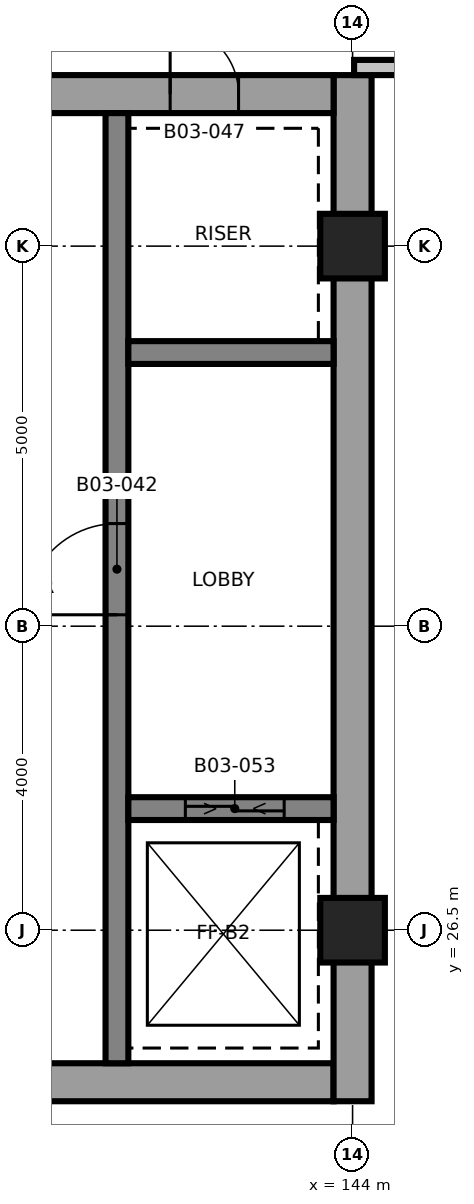
"""IFC4 building model, lengths in metres.
Left out: names, types, materials, properties, quantities, classifications, styles, units other than length and angle.
Written with IfcOpenShell. Run it as: python <this file> out.ifc"""

import sys

from ifc_helpers import new_model, si_unit, direction, frame, frame_2d, origin, origin_2d, place, context, subcontext, project, spatial, rectangle, extrude, element, fill, save


model = new_model("IFC4")
c1 = context("Model", 3, precision=1e-05, world=origin(), true_north=direction((0.0, 1.0)))
c2 = subcontext(c1, "Body", "Model", "MODEL_VIEW")
j1 = project(units=[si_unit("LENGTHUNIT", "METRE"), si_unit("PLANEANGLEUNIT", "RADIAN")], contexts=[c1])
p1 = place(None, origin())
s1 = spatial("IfcSite", under=j1, at=p1, CompositionType="ELEMENT")
p2 = place(p1, origin())
s2 = spatial("IfcBuilding", under=s1, at=p2, CompositionType="ELEMENT")
p3 = place(p2, frame((0.0, 0.0, 59.4)))
s3 = spatial("IfcBuildingStorey", under=s2, at=p3, CompositionType="ELEMENT", Elevation=59.4)
p4 = place(p3, frame((128.75, 24.5, 0.0), z_axis=(0.0, 0.0, 1.0), x_axis=(1.0, 0.0, 0.0)))
e1 = element("IfcWall", 1, at=p4, inside=s3, PredefinedType="SHEAR", context=c2, shape_type="SweptSolid", body=[
    extrude(rectangle(XDim=15.0, YDim=0.5, at=frame_2d((7.5, 0.0))), origin(), (0.0, 0.0, 1.0), 3.7),
])
p5 = place(p4, frame((9.65, 0.0, 0.0)))
e2 = element("IfcOpeningElement", 2, at=p5, cuts=e1, PredefinedType="OPENING", context=c2, shape_type="SweptSolid", body=[
    extrude(rectangle(XDim=1.5, YDim=2.1, at=frame_2d((0.75, 1.05))), frame((0.0, 0.26, 0.0), z_axis=(0.0, -1.0, 0.0), x_axis=(1.0, 0.0, 0.0)), (0.0, 0.0, 1.0), 0.52),
])
p6 = place(p4, frame((1.25, 0.0, 0.0)))
e3 = element("IfcOpeningElement", 3, at=p6, cuts=e1, PredefinedType="OPENING", context=c2, shape_type="SweptSolid", body=[
    extrude(rectangle(XDim=0.9, YDim=2.1, at=frame_2d((0.45, 1.05))), frame((0.0, 0.26, 0.0), z_axis=(0.0, -1.0, 0.0), x_axis=(1.0, 0.0, 0.0)), (0.0, 0.0, 1.0), 0.52),
])
p7 = place(p3, frame((144.0, 24.25, 0.0), z_axis=(0.0, 0.0, 1.0), x_axis=(0.0, 1.0, 0.0)))
e4 = element("IfcWall", 4, at=p7, inside=s3, PredefinedType="SHEAR", context=c2, shape_type="SweptSolid", body=[
    extrude(rectangle(XDim=13.5, YDim=0.5, at=frame_2d((6.75, 0.0))), origin(), (0.0, 0.0, 1.0), 3.7),
])
p8 = place(p3, frame((128.75, 37.5, 0.0), z_axis=(0.0, 0.0, 1.0), x_axis=(1.0, 0.0, 0.0)))
e5 = element("IfcWall", 5, at=p8, inside=s3, PredefinedType="SHEAR", context=c2, shape_type="SweptSolid", body=[
    extrude(rectangle(XDim=15.0, YDim=0.5, at=frame_2d((7.5, 0.0))), origin(), (0.0, 0.0, 1.0), 3.7),
])
p9 = place(p8, frame((9.65, 0.0, 0.0)))
e6 = element("IfcOpeningElement", 6, at=p9, cuts=e5, PredefinedType="OPENING", context=c2, shape_type="SweptSolid", body=[
    extrude(rectangle(XDim=1.5, YDim=2.1, at=frame_2d((0.75, 1.05))), frame((0.0, 0.26, 0.0), z_axis=(0.0, -1.0, 0.0), x_axis=(1.0, 0.0, 0.0)), (0.0, 0.0, 1.0), 0.52),
])
p10 = place(p8, frame((12.85, 0.0, 0.0)))
e7 = element("IfcOpeningElement", 7, at=p10, cuts=e5, PredefinedType="OPENING", context=c2, shape_type="SweptSolid", body=[
    extrude(rectangle(XDim=0.9, YDim=2.1, at=frame_2d((0.45, 1.05))), frame((0.0, 0.26, 0.0), z_axis=(0.0, -1.0, 0.0), x_axis=(1.0, 0.0, 0.0)), (0.0, 0.0, 1.0), 0.52),
])
p11 = place(p8, frame((3.8, 0.0, 0.0)))
e8 = element("IfcOpeningElement", 8, at=p11, cuts=e5, PredefinedType="OPENING", context=c2, shape_type="SweptSolid", body=[
    extrude(rectangle(XDim=0.9, YDim=2.1, at=frame_2d((0.45, 1.05))), frame((0.0, 0.26, 0.0), z_axis=(0.0, -1.0, 0.0), x_axis=(1.0, 0.0, 0.0)), (0.0, 0.0, 1.0), 0.52),
])
p12 = place(p8, frame((6.7, 0.0, 0.0)))
e9 = element("IfcOpeningElement", 9, at=p12, cuts=e5, PredefinedType="OPENING", context=c2, shape_type="SweptSolid", body=[
    extrude(rectangle(XDim=0.9, YDim=2.1, at=frame_2d((0.45, 1.05))), frame((0.0, 0.26, 0.0), z_axis=(0.0, -1.0, 0.0), x_axis=(1.0, 0.0, 0.0)), (0.0, 0.0, 1.0), 0.52),
])
p13 = place(p3, frame((140.9, 24.75, 0.0), z_axis=(0.0, 0.0, 1.0), x_axis=(0.0, 1.0, 0.0)))
e10 = element("IfcWall", 10, at=p13, inside=s3, PredefinedType="SHEAR", context=c2, shape_type="SweptSolid", body=[
    extrude(rectangle(XDim=12.5, YDim=0.3, at=frame_2d((6.25, 0.0))), origin(), (0.0, 0.0, 1.0), 3.7),
])
p14 = place(p13, frame((5.9, 0.0, 0.0)))
e11 = element("IfcOpeningElement", 11, at=p14, cuts=e10, PredefinedType="OPENING", context=c2, shape_type="SweptSolid", body=[
    extrude(rectangle(XDim=1.2, YDim=2.1, at=frame_2d((0.6, 1.05))), frame((0.0, 0.16, 0.0), z_axis=(0.0, -1.0, 0.0), x_axis=(1.0, 0.0, 0.0)), (0.0, 0.0, 1.0), 0.32),
])
p15 = place(p3, frame((141.05, 28.1, 0.0), z_axis=(0.0, 0.0, 1.0), x_axis=(1.0, 0.0, 0.0)))
e12 = element("IfcWall", 12, at=p15, inside=s3, PredefinedType="SHEAR", context=c2, shape_type="SweptSolid", body=[
    extrude(rectangle(XDim=2.7, YDim=0.3, at=frame_2d((1.35, 0.0))), origin(), (0.0, 0.0, 1.0), 3.7),
])
p16 = place(p15, frame((0.75, 0.0, 0.0)))
e13 = element("IfcOpeningElement", 13, at=p16, cuts=e12, PredefinedType="OPENING", context=c2, shape_type="SweptSolid", body=[
    extrude(rectangle(XDim=1.3, YDim=2.4, at=frame_2d((0.65, 1.2))), frame((0.0, 0.16, 0.0), z_axis=(0.0, -1.0, 0.0), x_axis=(1.0, 0.0, 0.0)), (0.0, 0.0, 1.0), 0.32),
])
p17 = place(p3, frame((141.05, 34.1, 0.0), z_axis=(0.0, 0.0, 1.0), x_axis=(1.0, 0.0, 0.0)))
e14 = element("IfcWall", 14, at=p17, inside=s3, PredefinedType="SHEAR", context=c2, shape_type="SweptSolid", body=[
    extrude(rectangle(XDim=2.7, YDim=0.3, at=frame_2d((1.35, 0.0))), origin(), (0.0, 0.0, 1.0), 3.7),
])
for number, where, z_axis, x_axis in (
    (15, (144.0, 26.5, 0.0), (0.0, 0.0, 1.0), (1.0, 0.0, 0.0)),
    (16, (144.0, 35.5, 0.0), (0.0, 0.0, 1.0), (1.0, 0.0, 0.0)),
):
    element("IfcColumn", number, at=place(p3, frame(where, z_axis=z_axis, x_axis=x_axis)), inside=s3, PredefinedType="COLUMN", context=c2, shape_type="SweptSolid", body=[
        extrude(rectangle(XDim=0.85, YDim=0.85, at=origin_2d()), origin(), (0.0, 0.0, 1.0), 3.7),
    ])
p18 = place(p3, frame((144.02, 37.85, 0.0), z_axis=(0.0, 0.0, 1.0), x_axis=(1.0, 0.0, 0.0)))
e17 = element("IfcWall", 17, at=p18, inside=s3, PredefinedType="PARTITIONING", context=c2, shape_type="SweptSolid", body=[
    extrude(rectangle(XDim=3.23, YDim=0.2, at=frame_2d((1.615, 0.0))), origin(), (0.0, 0.0, 1.0), 3.4),
])
p19 = place(p18, frame((1.03, 0.0, 0.0)))
e18 = element("IfcOpeningElement", 18, at=p19, cuts=e17, PredefinedType="OPENING", context=c2, shape_type="SweptSolid", body=[
    extrude(rectangle(XDim=1.5, YDim=2.1, at=frame_2d((0.75, 1.05))), frame((0.0, 0.11, 0.0), z_axis=(0.0, -1.0, 0.0), x_axis=(1.0, 0.0, 0.0)), (0.0, 0.0, 1.0), 0.22),
])
p20 = place(p14, origin())
e19 = element("IfcDoor", 19, at=p20, inside=s3, OperationType="SINGLE_SWING_RIGHT", PredefinedType="DOOR", context=c2, shape_type="SweptSolid", body=[
    extrude(rectangle(XDim=1.2, YDim=2.1, at=frame_2d((0.6, 1.05))), frame((0.0, 0.025, 0.0), z_axis=(0.0, -1.0, 0.0), x_axis=(1.0, 0.0, 0.0)), (0.0, 0.0, 1.0), 0.05),
])
fill(e11, e19)
p21 = place(p10, origin())
e20 = element("IfcDoor", 20, at=p21, inside=s3, OperationType="SINGLE_SWING_RIGHT", PredefinedType="DOOR", context=c2, shape_type="SweptSolid", body=[
    extrude(rectangle(XDim=0.9, YDim=2.1, at=frame_2d((0.45, 1.05))), frame((0.0, 0.025, 0.0), z_axis=(0.0, -1.0, 0.0), x_axis=(1.0, 0.0, 0.0)), (0.0, 0.0, 1.0), 0.05),
])
fill(e7, e20)
p22 = place(p16, origin())
e21 = element("IfcDoor", 21, at=p22, inside=s3, OperationType="SLIDING_TO_LEFT", PredefinedType="DOOR", context=c2, shape_type="SweptSolid", body=[
    extrude(rectangle(XDim=1.3, YDim=2.4, at=frame_2d((0.65, 1.2))), frame((0.0, 0.025, 0.0), z_axis=(0.0, -1.0, 0.0), x_axis=(1.0, 0.0, 0.0)), (0.0, 0.0, 1.0), 0.05),
])
fill(e13, e21)
save(model, sys.argv[1])
